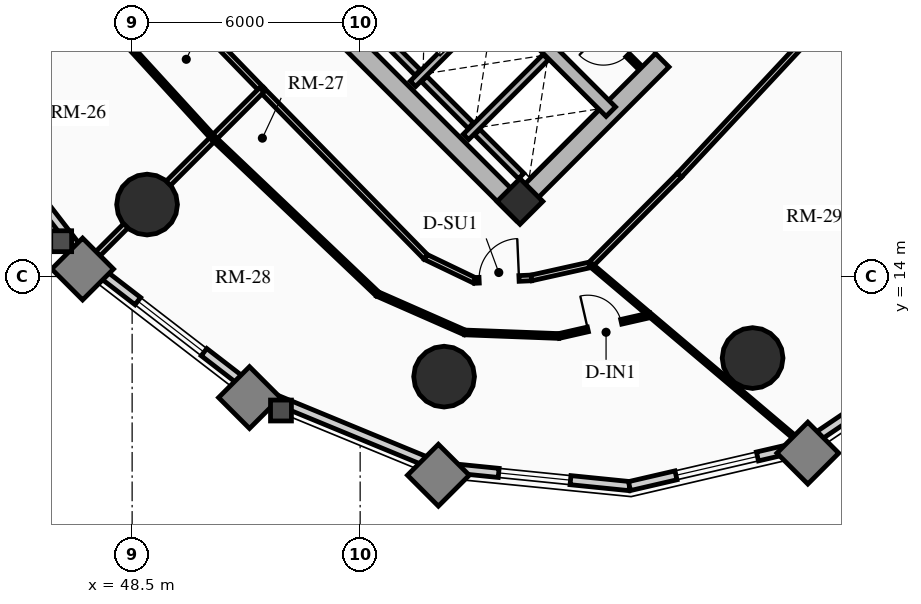
"""IFC4 building model, lengths in metres.
Left out: names, types, materials, properties, quantities, classifications, styles, units other than length and angle.
Written with IfcOpenShell. Run it as: python <this file> out.ifc"""

import sys

from ifc_helpers import new_model, si_unit, direction, frame, frame_2d, origin, origin_2d, place, context, subcontext, project, spatial, rectangle, circle, extrude, source, transform, mapped, element, fill, save


model = new_model("IFC4")
c1 = context("Model", 3, precision=1e-05, world=origin(), true_north=direction((0.0, 1.0)))
c2 = subcontext(c1, "Body", "Model", "MODEL_VIEW")
j1 = project(units=[si_unit("LENGTHUNIT", "METRE"), si_unit("PLANEANGLEUNIT", "RADIAN")], contexts=[c1])
p1 = place(None, origin())
s1 = spatial("IfcSite", under=j1, at=p1, CompositionType="ELEMENT")
p2 = place(p1, origin())
s2 = spatial("IfcBuilding", under=s1, at=p2, CompositionType="ELEMENT")
p3 = place(p2, frame((0.0, 0.0, 22.0)))
s3 = spatial("IfcBuildingStorey", under=s2, at=p3, CompositionType="ELEMENT", Elevation=22.0)
p4 = place(p3, frame((58.773, 15.661, 0.0), z_axis=(0.0, 0.0, 1.0), x_axis=(-0.707106781187, 0.707106781187, 0.0)))
e1 = element("IfcWall", 1, at=p4, inside=s3, PredefinedType="SHEAR", context=c2, shape_type="SweptSolid", body=[
    extrude(rectangle(XDim=14.3, YDim=0.5, at=frame_2d((7.15, 0.0))), origin(), (0.0, 0.0, 1.0), 2.91),
])
p5 = place(p3, frame((58.596, 15.838, 0.0), z_axis=(0.0, 0.0, 1.0), x_axis=(0.707106781187, 0.707106781187, 0.0)))
e2 = element("IfcWall", 2, at=p5, inside=s3, PredefinedType="SHEAR", context=c2, shape_type="SweptSolid", body=[
    extrude(rectangle(XDim=10.7, YDim=0.5, at=frame_2d((5.35, 0.0))), origin(), (0.0, 0.0, 1.0), 2.91),
])
m1 = source(origin(), c2, "Body", "SweptSolid", [
    extrude(rectangle(XDim=1.5, YDim=2.02, at=frame_2d((0.75, 1.01))), frame((0.0, 0.26, 0.0), z_axis=(0.0, -1.0, 0.0), x_axis=(1.0, 0.0, 0.0)), (0.0, 0.0, 1.0), 0.52),
])
p6 = place(p5, frame((5.45, 0.0, 0.0)))
e3 = element("IfcOpeningElement", 3, at=p6, cuts=e2, PredefinedType="OPENING", context=c2, shape_type="MappedRepresentation", body=[
    mapped(m1, transform((0.0, 0.0, 0.0), x_axis=(1.0, 0.0, 0.0), y_axis=(0.0, 1.0, 0.0), z_axis=(0.0, 0.0, 1.0), scale=1.0)),
])
p7 = place(p3, frame((61.096, 18.338, 0.0), z_axis=(0.0, 0.0, 1.0), x_axis=(-0.707106781187, 0.707106781187, 0.0)))
e4 = element("IfcWall", 4, at=p7, inside=s3, PredefinedType="SHEAR", context=c2, shape_type="SweptSolid", body=[
    extrude(rectangle(XDim=13.8, YDim=0.35, at=frame_2d((6.9, 0.0))), origin(), (0.0, 0.0, 1.0), 2.91),
])
m2 = source(origin(), c2, "Body", "SweptSolid", [
    extrude(rectangle(XDim=1.1, YDim=2.015, at=frame_2d((0.55, 1.007))), frame((0.0, 0.185, 0.0), z_axis=(0.0, -1.0, 0.0), x_axis=(1.0, 0.0, 0.0)), (0.0, 0.0, 1.0), 0.37),
])
p8 = place(p7, frame((4.9, 0.0, 0.0)))
e5 = element("IfcOpeningElement", 5, at=p8, cuts=e4, PredefinedType="OPENING", context=c2, shape_type="MappedRepresentation", body=[
    mapped(m2, transform((0.0, 0.0, 0.0), x_axis=(1.0, 0.0, 0.0), y_axis=(0.0, 1.0, 0.0), z_axis=(0.0, 0.0, 1.0), scale=1.0)),
])
m3 = source(origin(), c2, "Body", "SweptSolid", [
    extrude(rectangle(XDim=1.15, YDim=2.02, at=frame_2d((0.575, 1.01))), frame((0.0, 0.185, 0.0), z_axis=(0.0, -1.0, 0.0), x_axis=(1.0, 0.0, 0.0)), (0.0, 0.0, 1.0), 0.37),
])
p9 = place(p7, frame((7.32, 0.0, 0.0)))
e6 = element("IfcOpeningElement", 6, at=p9, cuts=e4, PredefinedType="OPENING", context=c2, shape_type="MappedRepresentation", body=[
    mapped(m3, transform((0.0, 0.0, 0.0), x_axis=(1.0, 0.0, 0.0), y_axis=(0.0, 1.0, 0.0), z_axis=(0.0, 0.0, 1.0), scale=1.0)),
])
p10 = place(p3, frame((58.706, 15.976, 0.0), z_axis=(0.0, 0.0, 1.0), x_axis=(0.707106781187, 0.707106781187, 0.0)))
e7 = element("IfcColumn", 7, at=p10, inside=s3, PredefinedType="COLUMN", context=c2, shape_type="SweptSolid", body=[
    extrude(rectangle(XDim=0.85, YDim=0.85, at=origin_2d()), origin(), (0.0, 0.0, 1.0), 2.91),
])
for number, where, z_axis, x_axis in (
    (8, (48.893, 15.893, 0.0), (0.0, 0.0, 1.0), (1.0, 0.0, 0.0)),
    (9, (56.709, 11.365, 0.0), (0.0, 0.0, 1.0), (1.0, 0.0, 0.0)),
    (10, (64.827, 11.854, 0.0), (0.0, 0.0, 1.0), (1.0, 0.0, 0.0)),
):
    element("IfcColumn", number, at=place(p3, frame(where, z_axis=z_axis, x_axis=x_axis)), inside=s3, PredefinedType="USERDEFINED", context=c2, shape_type="SweptSolid", body=[
        extrude(circle(Radius=0.8, at=origin_2d()), origin(), (0.0, 0.0, 1.0), 2.91),
    ])
p11 = place(p3, frame((47.352, 14.352, 0.0), z_axis=(0.0, 0.0, 1.0), x_axis=(-0.610557396243, 0.791972010801, 0.0)))
e11 = element("IfcWall", 11, at=p11, inside=s3, PredefinedType="SOLIDWALL", context=c2, shape_type="SweptSolid", body=[
    extrude(rectangle(XDim=5.475, YDim=0.24, at=frame_2d((2.737, 0.0))), origin(), (0.0, 0.0, 1.0), 2.073),
])
p12 = place(p3, frame((51.688, 11.01, 0.0), z_axis=(0.0, 0.0, 1.0), x_axis=(-0.791972010801, 0.610557396243, 0.0)))
e12 = element("IfcWall", 12, at=p12, inside=s3, PredefinedType="SOLIDWALL", context=c2, shape_type="SweptSolid", body=[
    extrude(rectangle(XDim=5.475, YDim=0.24, at=frame_2d((2.737, 0.0))), origin(), (0.0, 0.0, 1.0), 2.073),
])
m4 = source(origin(), c2, "Body", "SweptSolid", [
    extrude(rectangle(XDim=2.2, YDim=1.35, at=frame_2d((1.1, 0.675))), frame((0.0, 0.13, 0.0), z_axis=(0.0, -1.0, 0.0), x_axis=(1.0, 0.0, 0.0)), (0.0, 0.0, 1.0), 0.26),
])
p13 = place(p12, frame((1.637, 0.0, 0.65)))
e13 = element("IfcOpeningElement", 13, at=p13, cuts=e12, PredefinedType="OPENING", context=c2, shape_type="MappedRepresentation", body=[
    mapped(m4, transform((0.0, 0.0, 0.0), x_axis=(1.0, 0.0, 0.0), y_axis=(0.0, 1.0, 0.0), z_axis=(0.0, 0.0, 1.0), scale=1.0)),
])
p14 = place(p3, frame((56.593, 8.988, 0.0), z_axis=(0.0, 0.0, 1.0), x_axis=(-0.924528403616, 0.381113147118, 0.0)))
e14 = element("IfcWall", 14, at=p14, inside=s3, PredefinedType="SOLIDWALL", context=c2, shape_type="SweptSolid", body=[
    extrude(rectangle(XDim=5.305, YDim=0.24, at=frame_2d((2.653, 0.0))), origin(), (0.0, 0.0, 1.0), 2.073),
])
p15 = place(p3, frame((61.586, 8.484, 0.0), z_axis=(0.0, 0.0, 1.0), x_axis=(-0.994951574538, 0.100356187272, 0.0)))
e15 = element("IfcWall", 15, at=p15, inside=s3, PredefinedType="SOLIDWALL", context=c2, shape_type="SweptSolid", body=[
    extrude(rectangle(XDim=5.019, YDim=0.24, at=frame_2d((2.509, 0.0))), origin(), (0.0, 0.0, 1.0), 2.073),
])
m5 = source(origin(), c2, "Body", "SweptSolid", [
    extrude(rectangle(XDim=1.9, YDim=1.35, at=frame_2d((0.95, 0.675))), frame((0.0, 0.13, 0.0), z_axis=(0.0, -1.0, 0.0), x_axis=(1.0, 0.0, 0.0)), (0.0, 0.0, 1.0), 0.26),
])
p16 = place(p15, frame((1.559, 0.0, 0.65)))
e16 = element("IfcOpeningElement", 16, at=p16, cuts=e15, PredefinedType="OPENING", context=c2, shape_type="MappedRepresentation", body=[
    mapped(m5, transform((0.0, 0.0, 0.0), x_axis=(1.0, 0.0, 0.0), y_axis=(0.0, 1.0, 0.0), z_axis=(0.0, 0.0, 1.0), scale=1.0)),
])
p17 = place(p3, frame((66.18, 9.548, 0.0), z_axis=(0.0, 0.0, 1.0), x_axis=(-0.974197104074, -0.225698919833, 0.0)))
e17 = element("IfcWall", 17, at=p17, inside=s3, PredefinedType="SOLIDWALL", context=c2, shape_type="SweptSolid", body=[
    extrude(rectangle(XDim=4.715, YDim=0.24, at=frame_2d((2.357, 0.0))), origin(), (0.0, 0.0, 1.0), 2.073),
])
p18 = place(p17, frame((1.258, 0.0, 0.65)))
e18 = element("IfcOpeningElement", 18, at=p18, cuts=e17, PredefinedType="OPENING", context=c2, shape_type="MappedRepresentation", body=[
    mapped(m4, transform((0.0, 0.0, 0.0), x_axis=(1.0, 0.0, 0.0), y_axis=(0.0, 1.0, 0.0), z_axis=(0.0, 0.0, 1.0), scale=1.0)),
])
p19 = place(p3, frame((69.924, 12.076, 0.0), z_axis=(0.0, 0.0, 1.0), x_axis=(-0.828776615238, -0.559579594012, 0.0)))
e19 = element("IfcWall", 19, at=p19, inside=s3, PredefinedType="SOLIDWALL", context=c2, shape_type="SweptSolid", body=[
    extrude(rectangle(XDim=4.517, YDim=0.24, at=frame_2d((2.259, 0.0))), origin(), (0.0, 0.0, 1.0), 2.073),
])
p20 = place(p3, frame((55.888, 19.069, 0.0), z_axis=(0.0, 0.0, 1.0), x_axis=(0.707106781187, 0.707106781187, 0.0)))
e20 = element("IfcWall", 20, at=p20, inside=s3, PredefinedType="SHEAR", context=c2, shape_type="SweptSolid", body=[
    extrude(rectangle(XDim=2.97, YDim=0.2, at=frame_2d((1.485, 0.0))), origin(), (0.0, 0.0, 1.0), 2.91),
])
p21 = place(p3, frame((56.015, 19.366, 0.0), z_axis=(0.0, 0.0, 1.0), x_axis=(-0.707106781187, 0.707106781187, 0.0)))
e21 = element("IfcWall", 21, at=p21, inside=s3, PredefinedType="SHEAR", context=c2, shape_type="SweptSolid", body=[
    extrude(rectangle(XDim=2.44, YDim=0.2, at=frame_2d((1.22, 0.0))), origin(), (0.0, 0.0, 1.0), 2.91),
])
p22 = place(p3, frame((57.284, 17.673, 0.0), z_axis=(0.0, 0.0, 1.0), x_axis=(0.707147878904, 0.70706568108, 0.0)))
e22 = element("IfcWall", 22, at=p22, inside=s3, PredefinedType="SHEAR", context=c2, shape_type="SweptSolid", body=[
    extrude(rectangle(XDim=2.97, YDim=0.2, at=frame_2d((1.485, 0.0))), origin(), (0.0, 0.0, 1.0), 2.91),
])
p23 = place(p3, frame((57.412, 17.97, 0.0), z_axis=(0.0, 0.0, 1.0), x_axis=(-0.707106781187, 0.707106781187, 0.0)))
e23 = element("IfcWall", 23, at=p23, inside=s3, PredefinedType="SHEAR", context=c2, shape_type="SweptSolid", body=[
    extrude(rectangle(XDim=1.735, YDim=0.2, at=frame_2d((0.867, 0.0))), origin(), (0.0, 0.0, 1.0), 2.91),
])
p24 = place(p3, frame((58.737, 16.644, 0.0), z_axis=(0.0, 0.0, 1.0), x_axis=(-0.707032117043, 0.707181437447, 0.0)))
e24 = element("IfcWall", 24, at=p24, inside=s3, PredefinedType="SHEAR", context=c2, shape_type="SweptSolid", body=[
    extrude(rectangle(XDim=1.635, YDim=0.2, at=frame_2d((0.817, 0.0))), origin(), (0.0, 0.0, 1.0), 2.91),
])
p25 = place(p3, frame((61.835, 19.529, 0.0), z_axis=(0.0, 0.0, 1.0), x_axis=(-0.707174592913, 0.707038962956, 0.0)))
e25 = element("IfcWall", 25, at=p25, inside=s3, PredefinedType="PARTITIONING", context=c2, shape_type="SweptSolid", body=[
    extrude(rectangle(XDim=1.8, YDim=0.125, at=frame_2d((0.9, 0.0))), origin(), (0.0, 0.0, 1.0), 2.635),
])
m6 = source(origin(), c2, "Body", "SweptSolid", [
    extrude(rectangle(XDim=0.9, YDim=2.005, at=frame_2d((0.45, 1.002))), frame((0.0, 0.073, 0.0), z_axis=(0.0, -1.0, 0.0), x_axis=(1.0, 0.0, 0.0)), (0.0, 0.0, 1.0), 0.145),
])
p26 = place(p25, frame((0.42, 0.0, 0.0)))
e26 = element("IfcOpeningElement", 26, at=p26, cuts=e25, PredefinedType="OPENING", context=c2, shape_type="MappedRepresentation", body=[
    mapped(m6, transform((0.0, 0.0, 0.0), x_axis=(1.0, 0.0, 0.0), y_axis=(0.0, 1.0, 0.0), z_axis=(0.0, 0.0, 1.0), scale=1.0)),
])
p27 = place(p3, frame((47.706, 23.253, 0.0), z_axis=(0.0, 0.0, 1.0), x_axis=(0.696179266346, -0.717867974707, 0.0)))
e27 = element("IfcWall", 27, at=p27, inside=s3, PredefinedType="PARTITIONING", context=c2, shape_type="SweptSolid", body=[
    extrude(rectangle(XDim=6.045, YDim=0.15, at=frame_2d((3.022, 0.0))), origin(), (0.0, 0.0, 1.0), 2.635),
])
p28 = place(p3, frame((51.914, 18.914, 0.0), z_axis=(0.0, 0.0, 1.0), x_axis=(0.699999313799, -0.714143515465, 0.0)))
e28 = element("IfcWall", 28, at=p28, inside=s3, PredefinedType="PARTITIONING", context=c2, shape_type="SweptSolid", body=[
    extrude(rectangle(XDim=6.162, YDim=0.15, at=frame_2d((3.081, 0.0))), origin(), (0.0, 0.0, 1.0), 2.159),
])
p29 = place(p3, frame((56.227, 14.513, 0.0), z_axis=(0.0, 0.0, 1.0), x_axis=(0.901477579283, -0.432825801044, 0.0)))
e29 = element("IfcWall", 29, at=p29, inside=s3, PredefinedType="PARTITIONING", context=c2, shape_type="SweptSolid", body=[
    extrude(rectangle(XDim=1.424, YDim=0.15, at=frame_2d((0.712, 0.0))), origin(), (0.0, 0.0, 1.0), 2.205),
])
p30 = place(p3, frame((57.511, 13.897, 0.0), z_axis=(0.0, 0.0, 1.0), x_axis=(0.999024538494, 0.044158481476, 0.0)))
e30 = element("IfcWall", 30, at=p30, inside=s3, PredefinedType="PARTITIONING", context=c2, shape_type="SweptSolid", body=[
    extrude(rectangle(XDim=1.498, YDim=0.15, at=frame_2d((0.749, 0.0))), origin(), (0.0, 0.0, 1.0), 2.159),
])
m7 = source(origin(), c2, "Body", "SweptSolid", [
    extrude(rectangle(XDim=1.05, YDim=2.015, at=frame_2d((0.525, 1.007))), frame((0.0, 0.085, 0.0), z_axis=(0.0, -1.0, 0.0), x_axis=(1.0, 0.0, 0.0)), (0.0, 0.0, 1.0), 0.17),
])
p31 = place(p30, frame((0.12, 0.0, 0.0)))
e31 = element("IfcOpeningElement", 31, at=p31, cuts=e30, PredefinedType="OPENING", context=c2, shape_type="MappedRepresentation", body=[
    mapped(m7, transform((0.0, 0.0, 0.0), x_axis=(1.0, 0.0, 0.0), y_axis=(0.0, 1.0, 0.0), z_axis=(0.0, 0.0, 1.0), scale=1.0)),
])
p32 = place(p3, frame((59.008, 13.963, 0.0), z_axis=(0.0, 0.0, 1.0), x_axis=(0.976020856791, 0.21767702476, 0.0)))
e32 = element("IfcWall", 32, at=p32, inside=s3, PredefinedType="PARTITIONING", context=c2, shape_type="SweptSolid", body=[
    extrude(rectangle(XDim=1.593, YDim=0.15, at=frame_2d((0.796, 0.0))), origin(), (0.0, 0.0, 1.0), 2.205),
])
p33 = place(p3, frame((60.562, 14.31, 0.0), z_axis=(0.0, 0.0, 1.0), x_axis=(0.704566236161, 0.709638230975, 0.0)))
e33 = element("IfcWall", 33, at=p33, inside=s3, PredefinedType="PARTITIONING", context=c2, shape_type="SweptSolid", body=[
    extrude(rectangle(XDim=3.321, YDim=0.15, at=frame_2d((1.661, 0.0))), origin(), (0.0, 0.0, 1.0), 2.159),
])
p34 = place(p3, frame((62.903, 16.667, 0.0), z_axis=(0.0, 0.0, 1.0), x_axis=(0.682371947497, 0.731005147225, 0.0)))
e34 = element("IfcWall", 34, at=p34, inside=s3, PredefinedType="PARTITIONING", context=c2, shape_type="SweptSolid", body=[
    extrude(rectangle(XDim=6.642, YDim=0.15, at=frame_2d((3.321, 0.0))), origin(), (0.0, 0.0, 1.0), 2.159),
])
p35 = place(p3, frame((51.914, 18.914, 0.0), z_axis=(0.0, 0.0, 1.0), x_axis=(-0.707106781187, -0.707106781187, 0.0)))
e35 = element("IfcWall", 35, at=p35, inside=s3, PredefinedType="PARTITIONING", context=c2, shape_type="SweptSolid", body=[
    extrude(rectangle(XDim=6.431, YDim=0.16, at=frame_2d((3.215, 0.0))), origin(), (0.0, 0.0, 1.0), 2.073),
])
p36 = place(p3, frame((60.562, 14.31, 0.0), z_axis=(0.0, 0.0, 1.0), x_axis=(0.763547638675, -0.645751502881, 0.0)))
e36 = element("IfcWall", 36, at=p36, inside=s3, PredefinedType="MOVABLE", context=c2, shape_type="SweptSolid", body=[
    extrude(rectangle(XDim=7.345, YDim=0.1, at=frame_2d((3.673, 0.0))), origin(), (0.0, 0.0, 1.0), 2.073),
])
p37 = place(p3, frame((46.676, 21.978, 0.0), z_axis=(0.0, 0.0, 1.0), x_axis=(0.67473816271, -0.738057187339, 0.0)))
e37 = element("IfcWall", 37, at=p37, inside=s3, PredefinedType="PARTITIONING", context=c2, shape_type="SweptSolid", body=[
    extrude(rectangle(XDim=5.876, YDim=0.125, at=frame_2d((2.938, 0.0))), origin(), (0.0, 0.0, 1.0), 2.635),
])
p38 = place(p3, frame((50.641, 17.641, 0.0), z_axis=(0.0, 0.0, 1.0), x_axis=(0.724909383019, -0.688844239586, 0.0)))
e38 = element("IfcWall", 38, at=p38, inside=s3, PredefinedType="PARTITIONING", context=c2, shape_type="SweptSolid", body=[
    extrude(rectangle(XDim=5.957, YDim=0.125, at=frame_2d((2.979, 0.0))), origin(), (0.0, 0.0, 1.0), 2.159),
])
p39 = place(p3, frame((54.959, 13.537, 0.0), z_axis=(0.0, 0.0, 1.0), x_axis=(0.915414044123, -0.402513512596, 0.0)))
e39 = element("IfcWall", 39, at=p39, inside=s3, PredefinedType="PARTITIONING", context=c2, shape_type="SweptSolid", body=[
    extrude(rectangle(XDim=2.508, YDim=0.125, at=frame_2d((1.254, 0.0))), origin(), (0.0, 0.0, 1.0), 2.159),
])
p40 = place(p3, frame((57.255, 12.528, 0.0), z_axis=(0.0, 0.0, 1.0), x_axis=(0.999290303909, -0.037668136579, 0.0)))
e40 = element("IfcWall", 40, at=p40, inside=s3, PredefinedType="PARTITIONING", context=c2, shape_type="SweptSolid", body=[
    extrude(rectangle(XDim=2.476, YDim=0.125, at=frame_2d((1.238, 0.0))), origin(), (0.0, 0.0, 1.0), 2.159),
])
p41 = place(p3, frame((59.729, 12.434, 0.0), z_axis=(0.0, 0.0, 1.0), x_axis=(0.975062765266, 0.221929276555, 0.0)))
e41 = element("IfcWall", 41, at=p41, inside=s3, PredefinedType="PARTITIONING", context=c2, shape_type="SweptSolid", body=[
    extrude(rectangle(XDim=2.465, YDim=0.125, at=frame_2d((1.233, 0.0))), origin(), (0.0, 0.0, 1.0), 2.205),
])
p42 = place(p41, frame((0.783, 0.0, 0.0)))
e42 = element("IfcOpeningElement", 42, at=p42, cuts=e41, PredefinedType="OPENING", context=c2, shape_type="MappedRepresentation", body=[
    mapped(m6, transform((0.0, 0.0, 0.0), x_axis=(1.0, 0.0, 0.0), y_axis=(0.0, 1.0, 0.0), z_axis=(0.0, 0.0, 1.0), scale=1.0)),
])
m8 = source(origin(), c2, "Body", "SweptSolid", [
    extrude(rectangle(XDim=2.2, YDim=1.35, at=frame_2d((1.1, 0.675))), frame((0.0, 0.03, 0.0), z_axis=(0.0, -1.0, 0.0), x_axis=(1.0, 0.0, 0.0)), (0.0, 0.0, 1.0), 0.06),
])
p43 = place(p13, origin())
e43 = element("IfcWindow", 43, at=p43, inside=s3, PartitioningType="DOUBLE_PANEL_VERTICAL", PredefinedType="WINDOW", context=c2, shape_type="MappedRepresentation", body=[
    mapped(m8, transform((0.0, 0.0, 0.0), x_axis=(1.0, 0.0, 0.0), y_axis=(0.0, 1.0, 0.0), z_axis=(0.0, 0.0, 1.0), scale=1.0)),
])
fill(e13, e43)
m9 = source(origin(), c2, "Body", "SweptSolid", [
    extrude(rectangle(XDim=1.9, YDim=1.35, at=frame_2d((0.95, 0.675))), frame((0.0, 0.03, 0.0), z_axis=(0.0, -1.0, 0.0), x_axis=(1.0, 0.0, 0.0)), (0.0, 0.0, 1.0), 0.06),
])
p44 = place(p16, origin())
e44 = element("IfcWindow", 44, at=p44, inside=s3, PartitioningType="DOUBLE_PANEL_VERTICAL", PredefinedType="WINDOW", context=c2, shape_type="MappedRepresentation", body=[
    mapped(m9, transform((0.0, 0.0, 0.0), x_axis=(1.0, 0.0, 0.0), y_axis=(0.0, 1.0, 0.0), z_axis=(0.0, 0.0, 1.0), scale=1.0)),
])
fill(e16, e44)
p45 = place(p18, origin())
e45 = element("IfcWindow", 45, at=p45, inside=s3, PartitioningType="DOUBLE_PANEL_VERTICAL", PredefinedType="WINDOW", context=c2, shape_type="MappedRepresentation", body=[
    mapped(m8, transform((0.0, 0.0, 0.0), x_axis=(1.0, 0.0, 0.0), y_axis=(0.0, 1.0, 0.0), z_axis=(0.0, 0.0, 1.0), scale=1.0)),
])
fill(e18, e45)
m10 = source(origin(), c2, "Body", "SweptSolid", [
    extrude(rectangle(XDim=1.5, YDim=2.02, at=frame_2d((0.75, 1.01))), frame((0.0, 0.025, 0.0), z_axis=(0.0, -1.0, 0.0), x_axis=(1.0, 0.0, 0.0)), (0.0, 0.0, 1.0), 0.05),
])
p46 = place(p6, origin())
e46 = element("IfcDoor", 46, at=p46, inside=s3, OperationType="DOUBLE_DOOR_SINGLE_SWING", PredefinedType="DOOR", context=c2, shape_type="MappedRepresentation", body=[
    mapped(m10, transform((0.0, 0.0, 0.0), x_axis=(1.0, 0.0, 0.0), y_axis=(0.0, 1.0, 0.0), z_axis=(0.0, 0.0, 1.0), scale=1.0)),
])
fill(e3, e46)
m11 = source(origin(), c2, "Body", "SweptSolid", [
    extrude(rectangle(XDim=0.9, YDim=2.005, at=frame_2d((0.45, 1.002))), frame((0.0, 0.025, 0.0), z_axis=(0.0, -1.0, 0.0), x_axis=(1.0, 0.0, 0.0)), (0.0, 0.0, 1.0), 0.05),
])
p47 = place(p26, origin())
e47 = element("IfcDoor", 47, at=p47, inside=s3, OperationType="SINGLE_SWING_RIGHT", PredefinedType="DOOR", context=c2, shape_type="MappedRepresentation", body=[
    mapped(m11, transform((0.0, 0.0, 0.0), x_axis=(1.0, 0.0, 0.0), y_axis=(0.0, 1.0, 0.0), z_axis=(0.0, 0.0, 1.0), scale=1.0)),
])
fill(e26, e47)
m12 = source(origin(), c2, "Body", "SweptSolid", [
    extrude(rectangle(XDim=1.05, YDim=2.015, at=frame_2d((0.525, 1.007))), frame((0.0, 0.025, 0.0), z_axis=(0.0, -1.0, 0.0), x_axis=(1.0, 0.0, 0.0)), (0.0, 0.0, 1.0), 0.05),
])
p48 = place(p31, origin())
e48 = element("IfcDoor", 48, at=p48, inside=s3, OperationType="SINGLE_SWING_RIGHT", PredefinedType="DOOR", context=c2, shape_type="MappedRepresentation", body=[
    mapped(m12, transform((0.0, 0.0, 0.0), x_axis=(1.0, 0.0, 0.0), y_axis=(0.0, 1.0, 0.0), z_axis=(0.0, 0.0, 1.0), scale=1.0)),
])
fill(e31, e48)
p49 = place(p42, origin())
e49 = element("IfcDoor", 49, at=p49, inside=s3, OperationType="SINGLE_SWING_LEFT", PredefinedType="DOOR", context=c2, shape_type="MappedRepresentation", body=[
    mapped(m11, transform((0.0, 0.0, 0.0), x_axis=(1.0, 0.0, 0.0), y_axis=(0.0, 1.0, 0.0), z_axis=(0.0, 0.0, 1.0), scale=1.0)),
])
fill(e42, e49)
save(model, sys.argv[1])
